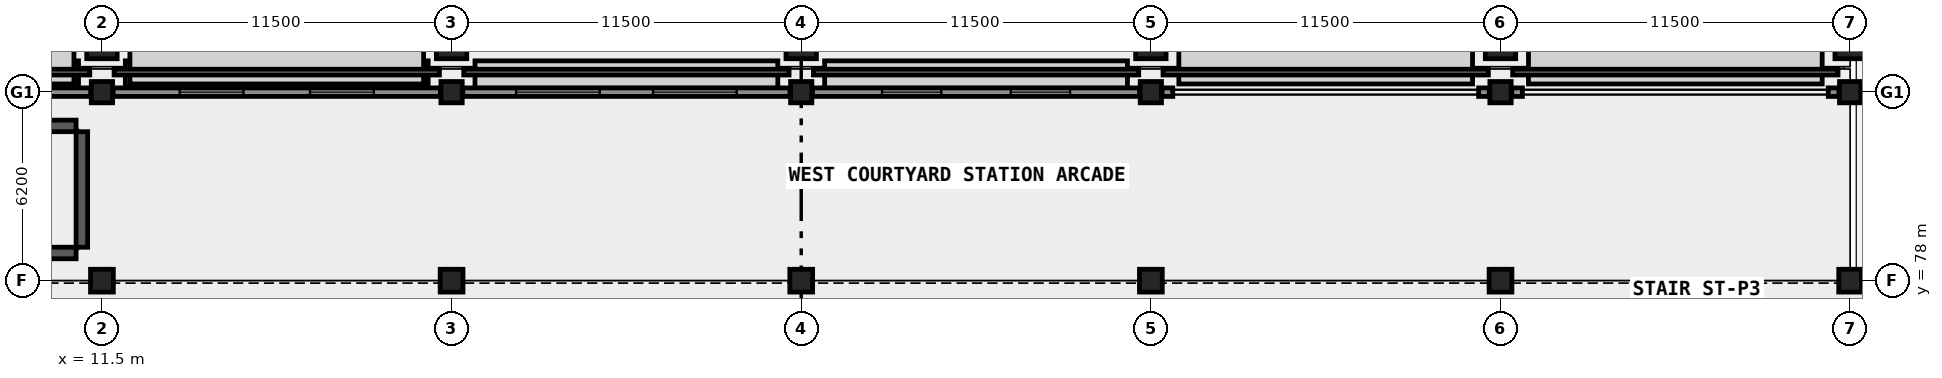
"""IFC4 building model, lengths in metres.
Left out: names, types, materials, properties, quantities, classifications, styles, units other than length and angle.
Written with IfcOpenShell. Run it as: python <this file> out.ifc"""

import sys

from ifc_helpers import new_model, si_unit, direction, frame, frame_2d, origin, origin_2d, place, context, subcontext, project, spatial, rectangle, extrude, element, fill, save


model = new_model("IFC4")
c1 = context("Model", 3, precision=1e-05, world=origin(), true_north=direction((0.0, 1.0)))
c2 = subcontext(c1, "Body", "Model", "MODEL_VIEW")
j1 = project(units=[si_unit("LENGTHUNIT", "METRE"), si_unit("PLANEANGLEUNIT", "RADIAN")], contexts=[c1])
p1 = place(None, origin())
s1 = spatial("IfcSite", under=j1, at=p1, CompositionType="ELEMENT")
p2 = place(p1, origin())
s2 = spatial("IfcBuilding", under=s1, at=p2, CompositionType="ELEMENT")
p3 = place(p2, origin())
s3 = spatial("IfcBuildingStorey", under=s2, at=p3, CompositionType="ELEMENT", Elevation=0.0)
p4 = place(p3, frame((11.5, 78.0, 0.0), z_axis=(0.0, 0.0, 1.0), x_axis=(1.0, 0.0, 0.0)))
e1 = element("IfcColumn", 1, at=p4, inside=s3, PredefinedType="COLUMN", context=c2, shape_type="SweptSolid", body=[
    extrude(rectangle(XDim=0.75, YDim=0.75, at=origin_2d()), origin(), (0.0, 0.0, 1.0), 4.2),
])
p5 = place(p3, frame((11.5, 84.2, 0.0), z_axis=(0.0, 0.0, 1.0), x_axis=(1.0, 0.0, 0.0)))
e2 = element("IfcColumn", 2, at=p5, inside=s3, PredefinedType="COLUMN", context=c2, shape_type="SweptSolid", body=[
    extrude(rectangle(XDim=0.7, YDim=0.7, at=origin_2d()), origin(), (0.0, 0.0, 1.0), 4.2),
])
p6 = place(p3, frame((11.5, 85.8, 0.0), z_axis=(0.0, 0.0, 1.0), x_axis=(1.0, 0.0, 0.0)))
e3 = element("IfcColumn", 3, at=p6, inside=s3, PredefinedType="COLUMN", context=c2, shape_type="SweptSolid", body=[
    extrude(rectangle(XDim=1.0, YDim=1.0, at=origin_2d()), origin(), (0.0, 0.0, 1.0), 4.2),
])
p7 = place(p3, frame((23.0, 78.0, 0.0), z_axis=(0.0, 0.0, 1.0), x_axis=(1.0, 0.0, 0.0)))
e4 = element("IfcColumn", 4, at=p7, inside=s3, PredefinedType="COLUMN", context=c2, shape_type="SweptSolid", body=[
    extrude(rectangle(XDim=0.75, YDim=0.75, at=origin_2d()), origin(), (0.0, 0.0, 1.0), 4.2),
])
p8 = place(p3, frame((23.0, 84.2, 0.0), z_axis=(0.0, 0.0, 1.0), x_axis=(1.0, 0.0, 0.0)))
e5 = element("IfcColumn", 5, at=p8, inside=s3, PredefinedType="COLUMN", context=c2, shape_type="SweptSolid", body=[
    extrude(rectangle(XDim=0.7, YDim=0.7, at=origin_2d()), origin(), (0.0, 0.0, 1.0), 4.2),
])
p9 = place(p3, frame((23.0, 85.8, 0.0), z_axis=(0.0, 0.0, 1.0), x_axis=(1.0, 0.0, 0.0)))
e6 = element("IfcColumn", 6, at=p9, inside=s3, PredefinedType="COLUMN", context=c2, shape_type="SweptSolid", body=[
    extrude(rectangle(XDim=1.0, YDim=1.0, at=origin_2d()), origin(), (0.0, 0.0, 1.0), 4.2),
])
p10 = place(p3, frame((34.5, 78.0, 0.0), z_axis=(0.0, 0.0, 1.0), x_axis=(1.0, 0.0, 0.0)))
e7 = element("IfcColumn", 7, at=p10, inside=s3, PredefinedType="COLUMN", context=c2, shape_type="SweptSolid", body=[
    extrude(rectangle(XDim=0.75, YDim=0.75, at=origin_2d()), origin(), (0.0, 0.0, 1.0), 4.2),
])
p11 = place(p3, frame((34.5, 84.2, 0.0), z_axis=(0.0, 0.0, 1.0), x_axis=(1.0, 0.0, 0.0)))
e8 = element("IfcColumn", 8, at=p11, inside=s3, PredefinedType="COLUMN", context=c2, shape_type="SweptSolid", body=[
    extrude(rectangle(XDim=0.7, YDim=0.7, at=origin_2d()), origin(), (0.0, 0.0, 1.0), 4.2),
])
p12 = place(p3, frame((34.5, 85.8, 0.0), z_axis=(0.0, 0.0, 1.0), x_axis=(1.0, 0.0, 0.0)))
e9 = element("IfcColumn", 9, at=p12, inside=s3, PredefinedType="COLUMN", context=c2, shape_type="SweptSolid", body=[
    extrude(rectangle(XDim=1.0, YDim=1.0, at=origin_2d()), origin(), (0.0, 0.0, 1.0), 4.2),
])
p13 = place(p3, frame((46.0, 78.0, 0.0), z_axis=(0.0, 0.0, 1.0), x_axis=(1.0, 0.0, 0.0)))
e10 = element("IfcColumn", 10, at=p13, inside=s3, PredefinedType="COLUMN", context=c2, shape_type="SweptSolid", body=[
    extrude(rectangle(XDim=0.75, YDim=0.75, at=origin_2d()), origin(), (0.0, 0.0, 1.0), 4.2),
])
p14 = place(p3, frame((46.0, 84.2, 0.0), z_axis=(0.0, 0.0, 1.0), x_axis=(1.0, 0.0, 0.0)))
e11 = element("IfcColumn", 11, at=p14, inside=s3, PredefinedType="COLUMN", context=c2, shape_type="SweptSolid", body=[
    extrude(rectangle(XDim=0.7, YDim=0.7, at=origin_2d()), origin(), (0.0, 0.0, 1.0), 4.2),
])
p15 = place(p3, frame((46.0, 85.8, 0.0), z_axis=(0.0, 0.0, 1.0), x_axis=(1.0, 0.0, 0.0)))
e12 = element("IfcColumn", 12, at=p15, inside=s3, PredefinedType="COLUMN", context=c2, shape_type="SweptSolid", body=[
    extrude(rectangle(XDim=1.0, YDim=1.0, at=origin_2d()), origin(), (0.0, 0.0, 1.0), 4.2),
])
p16 = place(p3, frame((57.5, 78.0, 0.0), z_axis=(0.0, 0.0, 1.0), x_axis=(1.0, 0.0, 0.0)))
e13 = element("IfcColumn", 13, at=p16, inside=s3, PredefinedType="COLUMN", context=c2, shape_type="SweptSolid", body=[
    extrude(rectangle(XDim=0.75, YDim=0.75, at=origin_2d()), origin(), (0.0, 0.0, 1.0), 4.2),
])
p17 = place(p3, frame((57.5, 84.2, 0.0), z_axis=(0.0, 0.0, 1.0), x_axis=(1.0, 0.0, 0.0)))
e14 = element("IfcColumn", 14, at=p17, inside=s3, PredefinedType="COLUMN", context=c2, shape_type="SweptSolid", body=[
    extrude(rectangle(XDim=0.7, YDim=0.7, at=origin_2d()), origin(), (0.0, 0.0, 1.0), 4.2),
])
p18 = place(p3, frame((57.5, 85.8, 0.0), z_axis=(0.0, 0.0, 1.0), x_axis=(1.0, 0.0, 0.0)))
e15 = element("IfcColumn", 15, at=p18, inside=s3, PredefinedType="COLUMN", context=c2, shape_type="SweptSolid", body=[
    extrude(rectangle(XDim=1.0, YDim=1.0, at=origin_2d()), origin(), (0.0, 0.0, 1.0), 4.2),
])
p19 = place(p3, frame((69.0, 78.0, 0.0), z_axis=(0.0, 0.0, 1.0), x_axis=(1.0, 0.0, 0.0)))
e16 = element("IfcColumn", 16, at=p19, inside=s3, PredefinedType="COLUMN", context=c2, shape_type="SweptSolid", body=[
    extrude(rectangle(XDim=0.75, YDim=0.75, at=origin_2d()), origin(), (0.0, 0.0, 1.0), 4.2),
])
p20 = place(p3, frame((69.0, 84.2, 0.0), z_axis=(0.0, 0.0, 1.0), x_axis=(1.0, 0.0, 0.0)))
e17 = element("IfcColumn", 17, at=p20, inside=s3, PredefinedType="COLUMN", context=c2, shape_type="SweptSolid", body=[
    extrude(rectangle(XDim=0.7, YDim=0.7, at=origin_2d()), origin(), (0.0, 0.0, 1.0), 4.2),
])
p21 = place(p3, frame((69.0, 85.8, 0.0), z_axis=(0.0, 0.0, 1.0), x_axis=(1.0, 0.0, 0.0)))
e18 = element("IfcColumn", 18, at=p21, inside=s3, PredefinedType="COLUMN", context=c2, shape_type="SweptSolid", body=[
    extrude(rectangle(XDim=1.0, YDim=1.0, at=origin_2d()), origin(), (0.0, 0.0, 1.0), 4.2),
])
p22 = place(p3, frame((2.05, 78.91, 0.0), z_axis=(0.0, 0.0, 1.0), x_axis=(1.0, 0.0, 0.0)))
e19 = element("IfcWall", 19, at=p22, inside=s3, PredefinedType="SHEAR", context=c2, shape_type="SweptSolid", body=[
    extrude(rectangle(XDim=8.6, YDim=0.38, at=frame_2d((4.3, 0.0))), origin(), (0.0, 0.0, 1.0), 4.2),
])
p23 = place(p22, frame((0.55, 0.0, 0.0)))
e20 = element("IfcOpeningElement", 20, at=p23, cuts=e19, PredefinedType="OPENING", context=c2, shape_type="SweptSolid", body=[
    extrude(rectangle(XDim=1.13, YDim=2.15, at=frame_2d((0.565, 1.075))), frame((0.0, 0.2, 0.0), z_axis=(0.0, -1.0, 0.0), x_axis=(1.0, 0.0, 0.0)), (0.0, 0.0, 1.0), 0.4),
])
p24 = place(p3, frame((2.05, 83.09, 0.0), z_axis=(0.0, 0.0, 1.0), x_axis=(1.0, 0.0, 0.0)))
e21 = element("IfcWall", 21, at=p24, inside=s3, PredefinedType="SHEAR", context=c2, shape_type="SweptSolid", body=[
    extrude(rectangle(XDim=8.6, YDim=0.38, at=frame_2d((4.3, 0.0))), origin(), (0.0, 0.0, 1.0), 4.2),
])
p25 = place(p3, frame((10.84, 79.1, 0.0), z_axis=(0.0, 0.0, 1.0), x_axis=(0.0, 1.0, 0.0)))
e22 = element("IfcWall", 22, at=p25, inside=s3, PredefinedType="SHEAR", context=c2, shape_type="SweptSolid", body=[
    extrude(rectangle(XDim=3.8, YDim=0.38, at=frame_2d((1.9, 0.0))), origin(), (0.0, 0.0, 1.0), 4.2),
])
for number, where, z_axis, x_axis in (
    (23, (46.37, 84.2, 0.0), (0.0, 0.0, 1.0), (1.0, 0.0, 0.0)),
    (24, (56.78, 84.2, 0.0), (0.0, 0.0, 1.0), (1.0, 0.0, 0.0)),
    (25, (57.87, 84.2, 0.0), (0.0, 0.0, 1.0), (1.0, 0.0, 0.0)),
    (26, (68.28, 84.2, 0.0), (0.0, 0.0, 1.0), (1.0, 0.0, 0.0)),
):
    element("IfcWall", number, at=place(p3, frame(where, z_axis=z_axis, x_axis=x_axis)), inside=s3, PredefinedType="SOLIDWALL", context=c2, shape_type="SweptSolid", body=[
        extrude(rectangle(XDim=0.35, YDim=0.28, at=frame_2d((0.175, 0.0))), origin(), (0.0, 0.0, 1.0), 3.85),
    ])
for number, where, z_axis, x_axis in (
    (27, (0.4, 84.86, 0.0), (0.0, 0.0, 1.0), (1.0, 0.0, 0.0)),
    (28, (11.9, 84.86, 0.0), (0.0, 0.0, 1.0), (1.0, 0.0, 0.0)),
    (29, (23.4, 84.86, 0.0), (0.0, 0.0, 1.0), (1.0, 0.0, 0.0)),
    (30, (34.9, 84.86, 0.0), (0.0, 0.0, 1.0), (1.0, 0.0, 0.0)),
    (31, (46.4, 84.86, 0.0), (0.0, 0.0, 1.0), (1.0, 0.0, 0.0)),
    (32, (57.9, 84.86, 0.0), (0.0, 0.0, 1.0), (1.0, 0.0, 0.0)),
):
    element("IfcWall", number, at=place(p3, frame(where, z_axis=z_axis, x_axis=x_axis)), inside=s3, PredefinedType="PARAPET", context=c2, shape_type="SweptSolid", body=[
        extrude(rectangle(XDim=10.7, YDim=0.19, at=frame_2d((5.35, 0.0))), origin(), (0.0, 0.0, 1.0), 1.15),
    ])
p26 = place(p3, frame((0.37, 84.2, 0.0), z_axis=(0.0, 0.0, 1.0), x_axis=(1.0, 0.0, 0.0)))
e33 = element("IfcWall", 33, at=p26, inside=s3, PredefinedType="SOLIDWALL", context=c2, shape_type="SweptSolid", body=[
    extrude(rectangle(XDim=10.76, YDim=0.28, at=frame_2d((5.38, 0.0))), origin(), (0.0, 0.0, 1.0), 3.0),
])
p27 = place(p26, frame((1.987, 0.0, 0.84)))
e34 = element("IfcOpeningElement", 34, at=p27, cuts=e33, PredefinedType="OPENING", context=c2, shape_type="SweptSolid", body=[
    extrude(rectangle(XDim=2.4, YDim=2.1, at=frame_2d((1.2, 1.05))), frame((0.0, 0.15, 0.0), z_axis=(0.0, -1.0, 0.0), x_axis=(1.0, 0.0, 0.0)), (0.0, 0.0, 1.0), 0.3),
])
p28 = place(p26, frame((6.373, 0.0, 0.84)))
e35 = element("IfcOpeningElement", 35, at=p28, cuts=e33, PredefinedType="OPENING", context=c2, shape_type="SweptSolid", body=[
    extrude(rectangle(XDim=2.4, YDim=2.1, at=frame_2d((1.2, 1.05))), frame((0.0, 0.15, 0.0), z_axis=(0.0, -1.0, 0.0), x_axis=(1.0, 0.0, 0.0)), (0.0, 0.0, 1.0), 0.3),
])
p29 = place(p3, frame((11.87, 84.2, 0.0), z_axis=(0.0, 0.0, 1.0), x_axis=(1.0, 0.0, 0.0)))
e36 = element("IfcWall", 36, at=p29, inside=s3, PredefinedType="SOLIDWALL", context=c2, shape_type="SweptSolid", body=[
    extrude(rectangle(XDim=10.76, YDim=0.28, at=frame_2d((5.38, 0.0))), origin(), (0.0, 0.0, 1.0), 3.0),
])
p30 = place(p29, frame((2.187, 0.0, 0.84)))
e37 = element("IfcOpeningElement", 37, at=p30, cuts=e36, PredefinedType="OPENING", context=c2, shape_type="SweptSolid", body=[
    extrude(rectangle(XDim=2.1, YDim=2.1, at=frame_2d((1.05, 1.05))), frame((0.0, 0.15, 0.0), z_axis=(0.0, -1.0, 0.0), x_axis=(1.0, 0.0, 0.0)), (0.0, 0.0, 1.0), 0.3),
])
p31 = place(p29, frame((6.473, 0.0, 0.84)))
e38 = element("IfcOpeningElement", 38, at=p31, cuts=e36, PredefinedType="OPENING", context=c2, shape_type="SweptSolid", body=[
    extrude(rectangle(XDim=2.1, YDim=2.1, at=frame_2d((1.05, 1.05))), frame((0.0, 0.15, 0.0), z_axis=(0.0, -1.0, 0.0), x_axis=(1.0, 0.0, 0.0)), (0.0, 0.0, 1.0), 0.3),
])
p32 = place(p3, frame((23.37, 84.2, 0.0), z_axis=(0.0, 0.0, 1.0), x_axis=(1.0, 0.0, 0.0)))
e39 = element("IfcWall", 39, at=p32, inside=s3, PredefinedType="SOLIDWALL", context=c2, shape_type="SweptSolid", body=[
    extrude(rectangle(XDim=10.76, YDim=0.28, at=frame_2d((5.38, 0.0))), origin(), (0.0, 0.0, 1.0), 3.0),
])
p33 = place(p32, frame((1.753, 0.0, 0.79)))
e40 = element("IfcOpeningElement", 40, at=p33, cuts=e39, PredefinedType="OPENING", context=c2, shape_type="SweptSolid", body=[
    extrude(rectangle(XDim=2.75, YDim=2.15, at=frame_2d((1.375, 1.075))), frame((0.0, 0.15, 0.0), z_axis=(0.0, -1.0, 0.0), x_axis=(1.0, 0.0, 0.0)), (0.0, 0.0, 1.0), 0.3),
])
p34 = place(p32, frame((6.257, 0.0, 0.79)))
e41 = element("IfcOpeningElement", 41, at=p34, cuts=e39, PredefinedType="OPENING", context=c2, shape_type="SweptSolid", body=[
    extrude(rectangle(XDim=2.75, YDim=2.15, at=frame_2d((1.375, 1.075))), frame((0.0, 0.15, 0.0), z_axis=(0.0, -1.0, 0.0), x_axis=(1.0, 0.0, 0.0)), (0.0, 0.0, 1.0), 0.3),
])
p35 = place(p3, frame((34.87, 84.2, 0.0), z_axis=(0.0, 0.0, 1.0), x_axis=(1.0, 0.0, 0.0)))
e42 = element("IfcWall", 42, at=p35, inside=s3, PredefinedType="SOLIDWALL", context=c2, shape_type="SweptSolid", body=[
    extrude(rectangle(XDim=10.76, YDim=0.28, at=frame_2d((5.38, 0.0))), origin(), (0.0, 0.0, 1.0), 3.0),
])
p36 = place(p35, frame((2.287, 0.0, 0.85)))
e43 = element("IfcOpeningElement", 43, at=p36, cuts=e42, PredefinedType="OPENING", context=c2, shape_type="SweptSolid", body=[
    extrude(rectangle(XDim=1.95, YDim=1.75, at=frame_2d((0.975, 0.875))), frame((0.0, 0.15, 0.0), z_axis=(0.0, -1.0, 0.0), x_axis=(1.0, 0.0, 0.0)), (0.0, 0.0, 1.0), 0.3),
])
p37 = place(p35, frame((6.523, 0.0, 0.85)))
e44 = element("IfcOpeningElement", 44, at=p37, cuts=e42, PredefinedType="OPENING", context=c2, shape_type="SweptSolid", body=[
    extrude(rectangle(XDim=1.95, YDim=1.75, at=frame_2d((0.975, 0.875))), frame((0.0, 0.15, 0.0), z_axis=(0.0, -1.0, 0.0), x_axis=(1.0, 0.0, 0.0)), (0.0, 0.0, 1.0), 0.3),
])
p38 = place(p30, origin())
e45 = element("IfcWindow", 45, at=p38, inside=s3, PartitioningType="SINGLE_PANEL", PredefinedType="WINDOW", context=c2, shape_type="SweptSolid", body=[
    extrude(rectangle(XDim=2.1, YDim=2.1, at=frame_2d((1.05, 1.05))), frame((0.0, 0.03, 0.0), z_axis=(0.0, -1.0, 0.0), x_axis=(1.0, 0.0, 0.0)), (0.0, 0.0, 1.0), 0.06),
])
fill(e37, e45)
p39 = place(p31, origin())
e46 = element("IfcWindow", 46, at=p39, inside=s3, PartitioningType="SINGLE_PANEL", PredefinedType="WINDOW", context=c2, shape_type="SweptSolid", body=[
    extrude(rectangle(XDim=2.1, YDim=2.1, at=frame_2d((1.05, 1.05))), frame((0.0, 0.03, 0.0), z_axis=(0.0, -1.0, 0.0), x_axis=(1.0, 0.0, 0.0)), (0.0, 0.0, 1.0), 0.06),
])
fill(e38, e46)
p40 = place(p33, origin())
e47 = element("IfcWindow", 47, at=p40, inside=s3, PartitioningType="SINGLE_PANEL", PredefinedType="WINDOW", context=c2, shape_type="SweptSolid", body=[
    extrude(rectangle(XDim=2.75, YDim=2.15, at=frame_2d((1.375, 1.075))), frame((0.0, 0.03, 0.0), z_axis=(0.0, -1.0, 0.0), x_axis=(1.0, 0.0, 0.0)), (0.0, 0.0, 1.0), 0.06),
])
fill(e40, e47)
p41 = place(p34, origin())
e48 = element("IfcWindow", 48, at=p41, inside=s3, PartitioningType="SINGLE_PANEL", PredefinedType="WINDOW", context=c2, shape_type="SweptSolid", body=[
    extrude(rectangle(XDim=2.75, YDim=2.15, at=frame_2d((1.375, 1.075))), frame((0.0, 0.03, 0.0), z_axis=(0.0, -1.0, 0.0), x_axis=(1.0, 0.0, 0.0)), (0.0, 0.0, 1.0), 0.06),
])
fill(e41, e48)
p42 = place(p36, origin())
e49 = element("IfcWindow", 49, at=p42, inside=s3, PartitioningType="SINGLE_PANEL", PredefinedType="WINDOW", context=c2, shape_type="SweptSolid", body=[
    extrude(rectangle(XDim=1.95, YDim=1.75, at=frame_2d((0.975, 0.875))), frame((0.0, 0.03, 0.0), z_axis=(0.0, -1.0, 0.0), x_axis=(1.0, 0.0, 0.0)), (0.0, 0.0, 1.0), 0.06),
])
fill(e43, e49)
p43 = place(p37, origin())
e50 = element("IfcWindow", 50, at=p43, inside=s3, PartitioningType="SINGLE_PANEL", PredefinedType="WINDOW", context=c2, shape_type="SweptSolid", body=[
    extrude(rectangle(XDim=1.95, YDim=1.75, at=frame_2d((0.975, 0.875))), frame((0.0, 0.03, 0.0), z_axis=(0.0, -1.0, 0.0), x_axis=(1.0, 0.0, 0.0)), (0.0, 0.0, 1.0), 0.06),
])
fill(e44, e50)
save(model, sys.argv[1])
